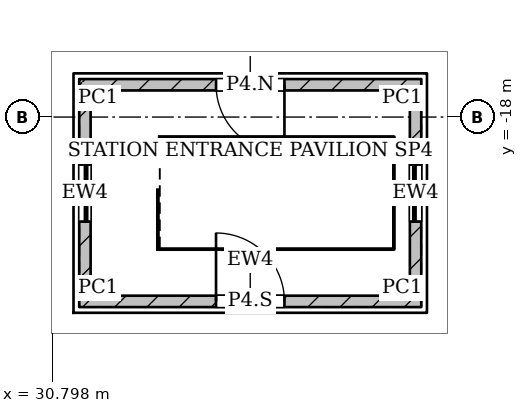
"""IFC4 building model, lengths in metres.
Left out: names, types, materials, properties, quantities, classifications, styles, units other than length and angle.
Written with IfcOpenShell. Run it as: python <this file> out.ifc"""

import sys

from ifc_helpers import new_model, si_unit, direction, frame, frame_2d, origin, origin_2d, place, context, subcontext, project, spatial, rectangle, extrude, element, fill, save


model = new_model("IFC4")
c1 = context("Model", 3, precision=1e-05, world=origin(), true_north=direction((0.0, 1.0)))
c2 = subcontext(c1, "Body", "Model", "MODEL_VIEW")
j1 = project(units=[si_unit("LENGTHUNIT", "METRE"), si_unit("PLANEANGLEUNIT", "RADIAN")], contexts=[c1])
p1 = place(None, origin())
s1 = spatial("IfcSite", under=j1, at=p1, CompositionType="ELEMENT")
p2 = place(p1, origin())
s2 = spatial("IfcBuilding", under=s1, at=p2, CompositionType="ELEMENT")
p3 = place(p2, origin())
s3 = spatial("IfcBuildingStorey", under=s2, at=p3, CompositionType="ELEMENT", Elevation=0.0)
p4 = place(p3, frame((31.5, -22.85, 0.0), z_axis=(0.0, 0.0, 1.0), x_axis=(1.0, 0.0, 0.0)))
e1 = element("IfcWall", 1, at=p4, inside=s3, PredefinedType="SOLIDWALL", context=c2, shape_type="SweptSolid", body=[
    extrude(rectangle(XDim=9.0, YDim=0.3, at=frame_2d((4.5, 0.0))), origin(), (0.0, 0.0, 1.0), 4.2),
])
p5 = place(p4, frame((3.6, 0.0, 0.0)))
e2 = element("IfcOpeningElement", 2, at=p5, cuts=e1, PredefinedType="OPENING", context=c2, shape_type="SweptSolid", body=[
    extrude(rectangle(XDim=1.8, YDim=2.4, at=frame_2d((0.9, 1.2))), frame((0.0, 0.16, 0.0), z_axis=(0.0, -1.0, 0.0), x_axis=(1.0, 0.0, 0.0)), (0.0, 0.0, 1.0), 0.32),
])
p6 = place(p3, frame((40.35, -22.7, 0.0), z_axis=(0.0, 0.0, 1.0), x_axis=(0.0, 1.0, 0.0)))
e3 = element("IfcWall", 3, at=p6, inside=s3, PredefinedType="SOLIDWALL", context=c2, shape_type="SweptSolid", body=[
    extrude(rectangle(XDim=5.4, YDim=0.3, at=frame_2d((2.7, 0.0))), origin(), (0.0, 0.0, 1.0), 4.2),
])
p7 = place(p6, frame((1.95, 0.0, 0.9)))
e4 = element("IfcOpeningElement", 4, at=p7, cuts=e3, PredefinedType="OPENING", context=c2, shape_type="SweptSolid", body=[
    extrude(rectangle(XDim=1.5, YDim=1.8, at=frame_2d((0.75, 0.9))), frame((0.0, 0.16, 0.0), z_axis=(0.0, -1.0, 0.0), x_axis=(1.0, 0.0, 0.0)), (0.0, 0.0, 1.0), 0.32),
])
p8 = place(p3, frame((40.5, -17.15, 0.0), z_axis=(0.0, 0.0, 1.0), x_axis=(-1.0, 0.0, 0.0)))
e5 = element("IfcWall", 5, at=p8, inside=s3, PredefinedType="SOLIDWALL", context=c2, shape_type="SweptSolid", body=[
    extrude(rectangle(XDim=9.0, YDim=0.3, at=frame_2d((4.5, 0.0))), origin(), (0.0, 0.0, 1.0), 4.2),
])
p9 = place(p8, frame((3.6, 0.0, 0.0)))
e6 = element("IfcOpeningElement", 6, at=p9, cuts=e5, PredefinedType="OPENING", context=c2, shape_type="SweptSolid", body=[
    extrude(rectangle(XDim=1.8, YDim=2.4, at=frame_2d((0.9, 1.2))), frame((0.0, 0.16, 0.0), z_axis=(0.0, -1.0, 0.0), x_axis=(1.0, 0.0, 0.0)), (0.0, 0.0, 1.0), 0.32),
])
p10 = place(p3, frame((31.65, -17.3, 0.0), z_axis=(0.0, 0.0, 1.0), x_axis=(0.0, -1.0, 0.0)))
e7 = element("IfcWall", 7, at=p10, inside=s3, PredefinedType="SOLIDWALL", context=c2, shape_type="SweptSolid", body=[
    extrude(rectangle(XDim=5.4, YDim=0.3, at=frame_2d((2.7, 0.0))), origin(), (0.0, 0.0, 1.0), 4.2),
])
p11 = place(p10, frame((1.95, 0.0, 0.9)))
e8 = element("IfcOpeningElement", 8, at=p11, cuts=e7, PredefinedType="OPENING", context=c2, shape_type="SweptSolid", body=[
    extrude(rectangle(XDim=1.5, YDim=1.8, at=frame_2d((0.75, 0.9))), frame((0.0, 0.16, 0.0), z_axis=(0.0, -1.0, 0.0), x_axis=(1.0, 0.0, 0.0)), (0.0, 0.0, 1.0), 0.32),
])
for number, where, z_axis, x_axis in (
    (9, (32.0, -22.5, 0.0), (0.0, 0.0, 1.0), (1.0, 0.0, 0.0)),
    (10, (40.0, -22.5, 0.0), (0.0, 0.0, 1.0), (1.0, 0.0, 0.0)),
    (11, (40.0, -17.5, 0.0), (0.0, 0.0, 1.0), (1.0, 0.0, 0.0)),
    (12, (32.0, -17.5, 0.0), (0.0, 0.0, 1.0), (1.0, 0.0, 0.0)),
):
    element("IfcColumn", number, at=place(p3, frame(where, z_axis=z_axis, x_axis=x_axis)), inside=s3, PredefinedType="COLUMN", context=c2, shape_type="SweptSolid", body=[
        extrude(rectangle(XDim=0.4, YDim=0.4, at=origin_2d()), origin(), (0.0, 0.0, 1.0), 4.2),
    ])
p12 = place(p5, origin())
e13 = element("IfcDoor", 13, at=p12, inside=s3, OperationType="DOUBLE_DOOR_DOUBLE_SWING", PredefinedType="DOOR", context=c2, shape_type="SweptSolid", body=[
    extrude(rectangle(XDim=1.8, YDim=2.4, at=frame_2d((0.9, 1.2))), frame((0.0, 0.025, 0.0), z_axis=(0.0, -1.0, 0.0), x_axis=(1.0, 0.0, 0.0)), (0.0, 0.0, 1.0), 0.05),
])
fill(e2, e13)
p13 = place(p7, origin())
e14 = element("IfcWindow", 14, at=p13, inside=s3, PartitioningType="SINGLE_PANEL", PredefinedType="WINDOW", context=c2, shape_type="SweptSolid", body=[
    extrude(rectangle(XDim=1.5, YDim=1.8, at=frame_2d((0.75, 0.9))), frame((0.0, 0.06, 0.0), z_axis=(0.0, -1.0, 0.0), x_axis=(1.0, 0.0, 0.0)), (0.0, 0.0, 1.0), 0.06),
])
fill(e4, e14)
p14 = place(p9, origin())
e15 = element("IfcDoor", 15, at=p14, inside=s3, OperationType="DOUBLE_DOOR_DOUBLE_SWING", PredefinedType="DOOR", context=c2, shape_type="SweptSolid", body=[
    extrude(rectangle(XDim=1.8, YDim=2.4, at=frame_2d((0.9, 1.2))), frame((0.0, 0.025, 0.0), z_axis=(0.0, -1.0, 0.0), x_axis=(1.0, 0.0, 0.0)), (0.0, 0.0, 1.0), 0.05),
])
fill(e6, e15)
p15 = place(p11, origin())
e16 = element("IfcWindow", 16, at=p15, inside=s3, PartitioningType="SINGLE_PANEL", PredefinedType="WINDOW", context=c2, shape_type="SweptSolid", body=[
    extrude(rectangle(XDim=1.5, YDim=1.8, at=frame_2d((0.75, 0.9))), frame((0.0, 0.06, 0.0), z_axis=(0.0, -1.0, 0.0), x_axis=(1.0, 0.0, 0.0)), (0.0, 0.0, 1.0), 0.06),
])
fill(e8, e16)
save(model, sys.argv[1])
